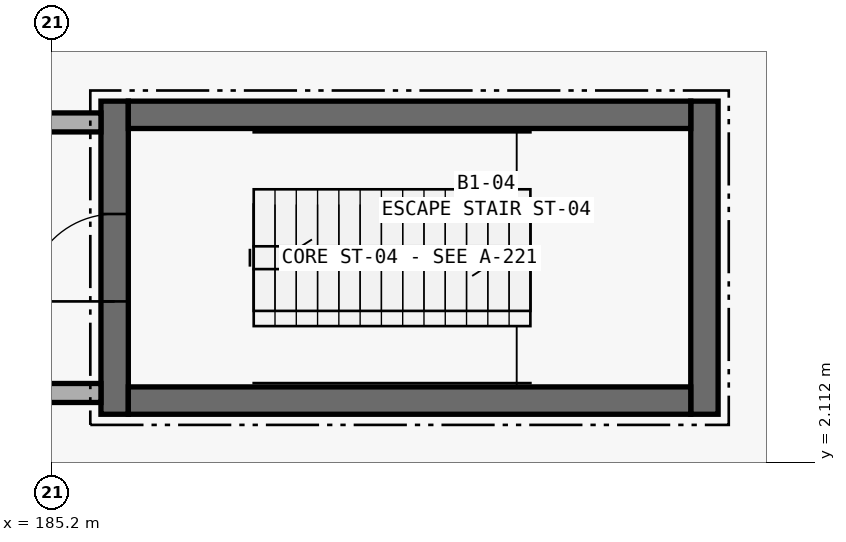
"""IFC4 building model, lengths in metres.
Left out: names, types, materials, properties, quantities, classifications, styles, units other than length and angle.
Written with IfcOpenShell. Run it as: python <this file> out.ifc"""

import sys

from ifc_helpers import new_model, si_unit, direction, frame, frame_2d, origin, place, context, subcontext, project, spatial, rectangle, extrude, element, fill, save


model = new_model("IFC4")
c1 = context("Model", 3, precision=1e-05, world=origin(), true_north=direction((0.0, 1.0)))
c2 = subcontext(c1, "Body", "Model", "MODEL_VIEW")
j1 = project(units=[si_unit("LENGTHUNIT", "METRE"), si_unit("PLANEANGLEUNIT", "RADIAN")], contexts=[c1])
p1 = place(None, origin())
s1 = spatial("IfcSite", under=j1, at=p1, CompositionType="ELEMENT")
p2 = place(p1, origin())
s2 = spatial("IfcBuilding", under=s1, at=p2, CompositionType="ELEMENT")
p3 = place(p2, frame((0.0, 0.0, -4.8)))
s3 = spatial("IfcBuildingStorey", under=s2, at=p3, CompositionType="ELEMENT", Elevation=-4.8)
p4 = place(p3, frame((186.02, 2.74, 0.0), z_axis=(0.0, 0.0, 1.0), x_axis=(0.0, 1.0, 0.0)))
e1 = element("IfcWall", 1, at=p4, inside=s3, PredefinedType="SHEAR", context=c2, shape_type="SweptSolid", body=[
    extrude(rectangle(XDim=4.12, YDim=0.36, at=frame_2d((2.06, 0.0))), origin(), (0.0, 0.0, 1.0), 4.38),
])
p5 = place(p4, frame((1.485, 0.0, 0.0)))
e2 = element("IfcOpeningElement", 2, at=p5, cuts=e1, PredefinedType="OPENING", context=c2, shape_type="SweptSolid", body=[
    extrude(rectangle(XDim=1.15, YDim=2.15, at=frame_2d((0.575, 1.075))), frame((0.0, 0.195, 0.0), z_axis=(0.0, -1.0, 0.0), x_axis=(1.0, 0.0, 0.0)), (0.0, 0.0, 1.0), 0.39),
])
p6 = place(p3, frame((193.78, 2.74, 0.0), z_axis=(0.0, 0.0, 1.0), x_axis=(0.0, 1.0, 0.0)))
e3 = element("IfcWall", 3, at=p6, inside=s3, PredefinedType="SHEAR", context=c2, shape_type="SweptSolid", body=[
    extrude(rectangle(XDim=4.12, YDim=0.36, at=frame_2d((2.06, 0.0))), origin(), (0.0, 0.0, 1.0), 4.38),
])
for number, where, z_axis, x_axis in (
    (4, (186.2, 6.68, 0.0), (0.0, 0.0, 1.0), (1.0, 0.0, 0.0)),
    (5, (186.2, 2.92, 0.0), (0.0, 0.0, 1.0), (1.0, 0.0, 0.0)),
):
    element("IfcWall", number, at=place(p3, frame(where, z_axis=z_axis, x_axis=x_axis)), inside=s3, PredefinedType="SHEAR", context=c2, shape_type="SweptSolid", body=[
        extrude(rectangle(XDim=7.4, YDim=0.36, at=frame_2d((3.7, 0.0))), origin(), (0.0, 0.0, 1.0), 4.38),
    ])
p7 = place(p3, frame((181.795, 3.02, 0.0), z_axis=(0.0, 0.0, 1.0), x_axis=(1.0, 0.0, 0.0)))
e6 = element("IfcWall", 6, at=p7, inside=s3, PredefinedType="PARTITIONING", context=c2, shape_type="SweptSolid", body=[
    extrude(rectangle(XDim=4.045, YDim=0.25, at=frame_2d((2.022, 0.0))), origin(), (0.0, 0.0, 1.0), 3.26),
])
p8 = place(p3, frame((184.655, 6.58, 0.0), z_axis=(0.0, 0.0, 1.0), x_axis=(1.0, 0.0, 0.0)))
e7 = element("IfcWall", 7, at=p8, inside=s3, PredefinedType="PARTITIONING", context=c2, shape_type="SweptSolid", body=[
    extrude(rectangle(XDim=1.185, YDim=0.25, at=frame_2d((0.593, 0.0))), origin(), (0.0, 0.0, 1.0), 3.26),
])
p9 = place(p5, origin())
e8 = element("IfcDoor", 8, at=p9, inside=s3, OperationType="SINGLE_SWING_LEFT", PredefinedType="DOOR", context=c2, shape_type="SweptSolid", body=[
    extrude(rectangle(XDim=1.15, YDim=2.15, at=frame_2d((0.575, 1.075))), frame((0.0, 0.025, 0.0), z_axis=(0.0, -1.0, 0.0), x_axis=(1.0, 0.0, 0.0)), (0.0, 0.0, 1.0), 0.05),
])
fill(e2, e8)
save(model, sys.argv[1])
